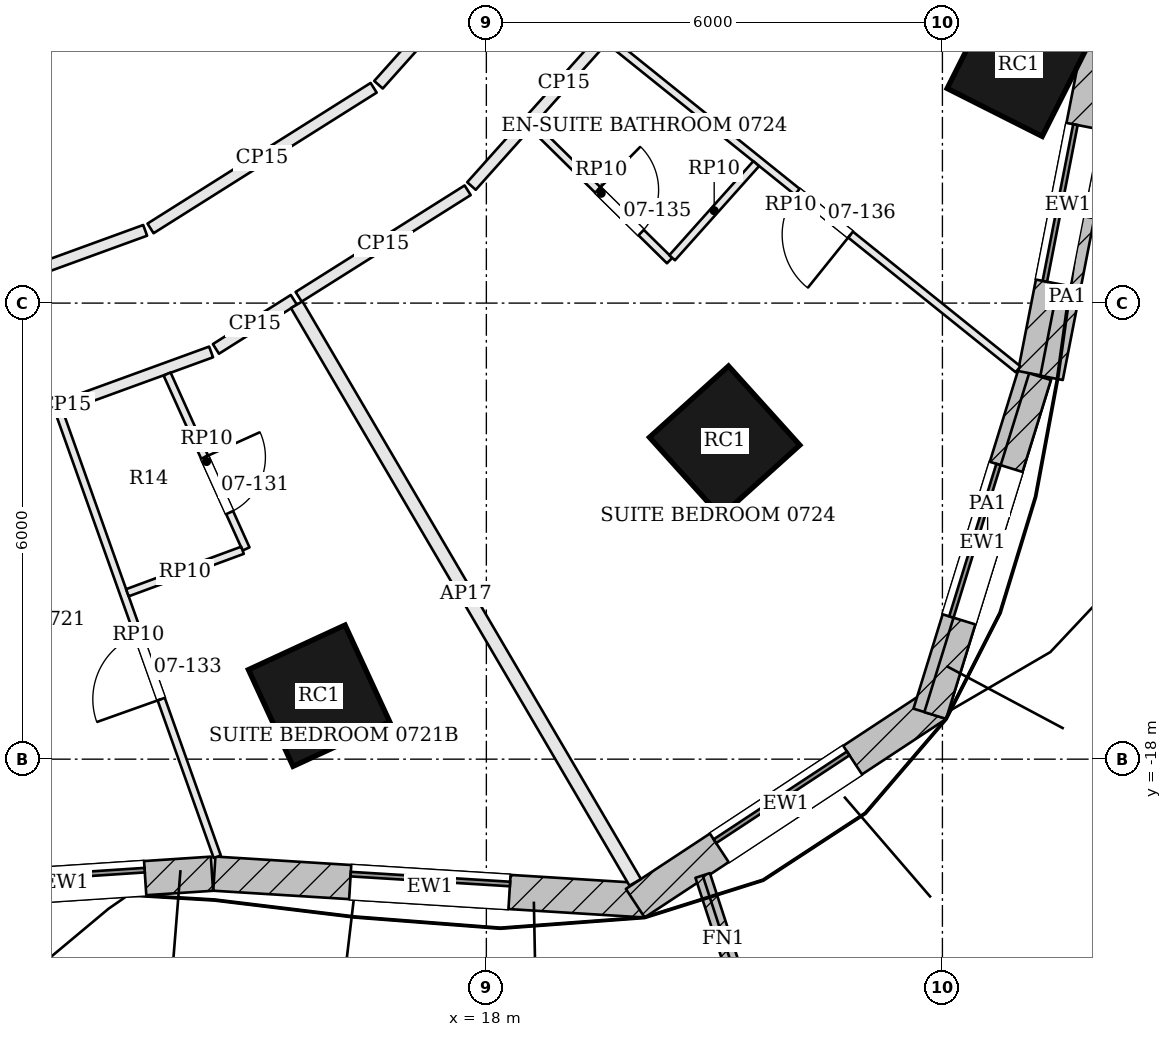
"""IFC4 building model, lengths in metres.
Left out: names, types, materials, properties, quantities, classifications, styles, units other than length and angle.
Written with IfcOpenShell. Run it as: python <this file> out.ifc"""

import sys

from ifc_helpers import new_model, si_unit, direction, frame, frame_2d, origin, origin_2d, place, context, subcontext, project, spatial, rectangle, extrude, element, fill, save


model = new_model("IFC4")
c1 = context("Model", 3, precision=1e-05, world=origin(), true_north=direction((0.0, 1.0)))
c2 = subcontext(c1, "Body", "Model", "MODEL_VIEW")
j1 = project(units=[si_unit("LENGTHUNIT", "METRE"), si_unit("PLANEANGLEUNIT", "RADIAN")], contexts=[c1])
p1 = place(None, origin())
s1 = spatial("IfcSite", under=j1, at=p1, CompositionType="ELEMENT")
p2 = place(p1, origin())
s2 = spatial("IfcBuilding", under=s1, at=p2, CompositionType="ELEMENT")
p3 = place(p2, frame((0.0, 0.0, 41.1)))
s3 = spatial("IfcBuildingStorey", under=s2, at=p3, CompositionType="ELEMENT", Elevation=41.1)
for number, where, z_axis, x_axis in (
    (1, (15.799, -17.165, 0.0), (0.0, 0.0, 1.0), (0.908, 0.419, 0.0)),
    (2, (21.135, -13.817, 0.0), (0.0, 0.0, 1.0), (0.743, 0.67, 0.0)),
    (3, (25.003, -8.866, 0.0), (0.0, 0.0, 1.0), (0.45, 0.893, 0.0)),
):
    element("IfcColumn", number, at=place(p3, frame(where, z_axis=z_axis, x_axis=x_axis)), inside=s3, PredefinedType="COLUMN", context=c2, shape_type="SweptSolid", body=[
        extrude(rectangle(XDim=1.4, YDim=1.4, at=origin_2d()), origin(), (0.0, 0.0, 1.0), 3.6),
    ])
p4 = place(p3, frame((10.537, -19.761, 0.0), z_axis=(0.0, 0.0, 1.0), x_axis=(0.997831357874, 0.065822346084, 0.0)))
e4 = element("IfcWall", 4, at=p4, inside=s3, PredefinedType="SOLIDWALL", context=c2, shape_type="SweptSolid", body=[
    extrude(rectangle(XDim=3.861, YDim=0.45, at=frame_2d((1.931, 0.0))), origin(), (0.0, 0.0, 1.0), 3.4),
])
p5 = place(p4, frame((0.881, 0.0, 0.9)))
e5 = element("IfcOpeningElement", 5, at=p5, cuts=e4, PredefinedType="OPENING", context=c2, shape_type="SweptSolid", body=[
    extrude(rectangle(XDim=2.1, YDim=2.0, at=frame_2d((1.05, 1.0))), frame((0.0, 0.235, 0.0), z_axis=(0.0, -1.0, 0.0), x_axis=(1.0, 0.0, 0.0)), (0.0, 0.0, 1.0), 0.47),
])
p6 = place(p3, frame((14.421, -19.506, 0.0), z_axis=(0.0, 0.0, 1.0), x_axis=(0.998078573447, -0.06196096534, 0.0)))
e6 = element("IfcWall", 6, at=p6, inside=s3, PredefinedType="SOLIDWALL", context=c2, shape_type="SweptSolid", body=[
    extrude(rectangle(XDim=5.682, YDim=0.45, at=frame_2d((2.841, 0.0))), origin(), (0.0, 0.0, 1.0), 3.4),
])
p7 = place(p6, frame((1.791, 0.0, 0.9)))
e7 = element("IfcOpeningElement", 7, at=p7, cuts=e6, PredefinedType="OPENING", context=c2, shape_type="SweptSolid", body=[
    extrude(rectangle(XDim=2.1, YDim=2.0, at=frame_2d((1.05, 1.0))), frame((0.0, 0.235, 0.0), z_axis=(0.0, -1.0, 0.0), x_axis=(1.0, 0.0, 0.0)), (0.0, 0.0, 1.0), 0.47),
])
p8 = place(p3, frame((19.959, -19.895, 0.0), z_axis=(0.0, 0.0, 1.0), x_axis=(0.835201398752, 0.549944200372, 0.0)))
e8 = element("IfcWall", 8, at=p8, inside=s3, PredefinedType="SOLIDWALL", context=c2, shape_type="SweptSolid", body=[
    extrude(rectangle(XDim=4.748, YDim=0.45, at=frame_2d((2.374, 0.0))), origin(), (0.0, 0.0, 1.0), 3.4),
])
p9 = place(p8, frame((1.324, 0.0, 0.9)))
e9 = element("IfcOpeningElement", 9, at=p9, cuts=e8, PredefinedType="OPENING", context=c2, shape_type="SweptSolid", body=[
    extrude(rectangle(XDim=2.1, YDim=2.0, at=frame_2d((1.05, 1.0))), frame((0.0, 0.235, 0.0), z_axis=(0.0, -1.0, 0.0), x_axis=(1.0, 0.0, 0.0)), (0.0, 0.0, 1.0), 0.47),
])
p10 = place(p3, frame((23.834, -17.402, 0.0), z_axis=(0.0, 0.0, 1.0), x_axis=(0.2954658114, 0.955353313855, 0.0)))
e10 = element("IfcWall", 10, at=p10, inside=s3, PredefinedType="SOLIDWALL", context=c2, shape_type="SweptSolid", body=[
    extrude(rectangle(XDim=4.698, YDim=0.45, at=frame_2d((2.349, 0.0))), origin(), (0.0, 0.0, 1.0), 3.4),
])
p11 = place(p10, frame((1.299, 0.0, 0.9)))
e11 = element("IfcOpeningElement", 11, at=p11, cuts=e10, PredefinedType="OPENING", context=c2, shape_type="SweptSolid", body=[
    extrude(rectangle(XDim=2.1, YDim=2.0, at=frame_2d((1.05, 1.0))), frame((0.0, 0.235, 0.0), z_axis=(0.0, -1.0, 0.0), x_axis=(1.0, 0.0, 0.0)), (0.0, 0.0, 1.0), 0.47),
])
p12 = place(p3, frame((25.216, -12.936, 0.0), z_axis=(0.0, 0.0, 1.0), x_axis=(0.191564556994, 0.981480015336, 0.0)))
e12 = element("IfcWall", 12, at=p12, inside=s3, PredefinedType="SOLIDWALL", context=c2, shape_type="SweptSolid", body=[
    extrude(rectangle(XDim=4.551, YDim=0.45, at=frame_2d((2.275, 0.0))), origin(), (0.0, 0.0, 1.0), 3.4),
])
p13 = place(p12, frame((1.226, 0.0, 0.9)))
e13 = element("IfcOpeningElement", 13, at=p13, cuts=e12, PredefinedType="OPENING", context=c2, shape_type="SweptSolid", body=[
    extrude(rectangle(XDim=2.1, YDim=2.0, at=frame_2d((1.05, 1.0))), frame((0.0, 0.235, 0.0), z_axis=(0.0, -1.0, 0.0), x_axis=(1.0, 0.0, 0.0)), (0.0, 0.0, 1.0), 0.47),
])
p14 = place(p3, frame((20.846, -19.53, 0.0), z_axis=(0.0, 0.0, 1.0), x_axis=(0.309732726603, -0.950823662974, 0.0)))
e14 = element("IfcWall", 14, at=p14, inside=s3, PredefinedType="SOLIDWALL", context=c2, shape_type="SweptSolid", body=[
    extrude(rectangle(XDim=1.75, YDim=0.2, at=frame_2d((0.875, 0.0))), origin(), (0.0, 0.0, 1.0), 3.4),
])
p15 = place(p3, frame((23.906, -17.425, 3.6), z_axis=(0.0, 0.0, 1.0), x_axis=(0.295431319656, 0.955363980568, 0.0)))
e15 = element("IfcWall", 15, at=p15, inside=s3, PredefinedType="PARAPET", context=c2, shape_type="SweptSolid", body=[
    extrude(rectangle(XDim=4.666, YDim=0.3, at=frame_2d((2.333, 0.0))), origin(), (0.0, 0.0, 1.0), 1.1),
])
p16 = place(p3, frame((25.436, -12.983, 3.6), z_axis=(0.0, 0.0, 1.0), x_axis=(0.191565926717, 0.981479747993, 0.0)))
e16 = element("IfcWall", 16, at=p16, inside=s3, PredefinedType="PARAPET", context=c2, shape_type="SweptSolid", body=[
    extrude(rectangle(XDim=2.168, YDim=0.3, at=frame_2d((1.084, 0.0))), origin(), (0.0, 0.0, 1.0), 1.1),
])
p17 = place(p3, frame((10.543, -14.04, 0.0), z_axis=(0.0, 0.0, 1.0), x_axis=(0.939576705301, 0.342338450741, 0.0)))
e17 = element("IfcWall", 17, at=p17, inside=s3, PredefinedType="PARTITIONING", context=c2, shape_type="SweptSolid", body=[
    extrude(rectangle(XDim=4.082, YDim=0.15, at=frame_2d((2.041, 0.0))), origin(), (0.0, 0.0, 1.0), 2.68),
])
p18 = place(p3, frame((14.442, -12.603, 0.0), z_axis=(0.0, 0.0, 1.0), x_axis=(0.845976983642, 0.533219413701, 0.0)))
e18 = element("IfcWall", 18, at=p18, inside=s3, PredefinedType="PARTITIONING", context=c2, shape_type="SweptSolid", body=[
    extrude(rectangle(XDim=1.211, YDim=0.15, at=frame_2d((0.606, 0.0))), origin(), (0.0, 0.0, 1.0), 2.68),
])
p19 = place(p3, frame((19.958, -19.62, 0.0), z_axis=(0.0, 0.0, 1.0), x_axis=(-0.505643381875, 0.862742586387, 0.0)))
e19 = element("IfcWall", 19, at=p19, inside=s3, PredefinedType="PARTITIONING", context=c2, shape_type="SweptSolid", body=[
    extrude(rectangle(XDim=8.808, YDim=0.175, at=frame_2d((4.404, 0.0))), origin(), (0.0, 0.0, 1.0), 2.68),
])
p20 = place(p3, frame((15.531, -11.917, 0.0), z_axis=(0.0, 0.0, 1.0), x_axis=(0.84600940038, 0.533167979598, 0.0)))
e20 = element("IfcWall", 20, at=p20, inside=s3, PredefinedType="PARTITIONING", context=c2, shape_type="SweptSolid", body=[
    extrude(rectangle(XDim=2.628, YDim=0.15, at=frame_2d((1.314, 0.0))), origin(), (0.0, 0.0, 1.0), 2.68),
])
p21 = place(p3, frame((17.804, -10.46, 0.0), z_axis=(0.0, 0.0, 1.0), x_axis=(0.666597463623, 0.745417883802, 0.0)))
e21 = element("IfcWall", 21, at=p21, inside=s3, PredefinedType="PARTITIONING", context=c2, shape_type="SweptSolid", body=[
    extrude(rectangle(XDim=3.652, YDim=0.15, at=frame_2d((1.826, 0.0))), origin(), (0.0, 0.0, 1.0), 2.68),
])
p22 = place(p3, frame((18.673, -6.788, 0.0), z_axis=(0.0, 0.0, 1.0), x_axis=(-0.666610670036, -0.745406073623, 0.0)))
e22 = element("IfcWall", 22, at=p22, inside=s3, PredefinedType="PARTITIONING", context=c2, shape_type="SweptSolid", body=[
    extrude(rectangle(XDim=3.139, YDim=0.15, at=frame_2d((1.569, 0.0))), origin(), (0.0, 0.0, 1.0), 2.68),
])
p23 = place(p3, frame((16.517, -9.167, 0.0), z_axis=(0.0, 0.0, 1.0), x_axis=(-0.846000117603, -0.533182708849, 0.0)))
e23 = element("IfcWall", 23, at=p23, inside=s3, PredefinedType="PARTITIONING", context=c2, shape_type="SweptSolid", body=[
    extrude(rectangle(XDim=3.47, YDim=0.15, at=frame_2d((1.735, 0.0))), origin(), (0.0, 0.0, 1.0), 2.68),
])
p24 = place(p3, frame((13.511, -11.043, 0.0), z_axis=(0.0, 0.0, 1.0), x_axis=(-0.939583191704, -0.342320647736, 0.0)))
e24 = element("IfcWall", 24, at=p24, inside=s3, PredefinedType="PARTITIONING", context=c2, shape_type="SweptSolid", body=[
    extrude(rectangle(XDim=3.733, YDim=0.15, at=frame_2d((1.866, 0.0))), origin(), (0.0, 0.0, 1.0), 2.68),
])
p25 = place(p3, frame((14.459, -19.283, 0.0), z_axis=(0.0, 0.0, 1.0), x_axis=(-0.33505478158, 0.942198648556, 0.0)))
e25 = element("IfcWall", 25, at=p25, inside=s3, PredefinedType="PARTITIONING", context=c2, shape_type="SweptSolid", body=[
    extrude(rectangle(XDim=6.192, YDim=0.1, at=frame_2d((3.096, 0.0))), origin(), (0.0, 0.0, 1.0), 2.68),
])
p26 = place(p25, frame((2.2, 0.0, 0.0)))
e26 = element("IfcOpeningElement", 26, at=p26, cuts=e25, PredefinedType="OPENING", context=c2, shape_type="SweptSolid", body=[
    extrude(rectangle(XDim=0.9, YDim=2.4, at=frame_2d((0.45, 1.2))), frame((0.0, 0.06, 0.0), z_axis=(0.0, -1.0, 0.0), x_axis=(1.0, 0.0, 0.0)), (0.0, 0.0, 1.0), 0.12),
])
p27 = place(p3, frame((13.8, -12.933, 0.0), z_axis=(0.0, 0.0, 1.0), x_axis=(0.411317277425, -0.91149223655, 0.0)))
e27 = element("IfcWall", 27, at=p27, inside=s3, PredefinedType="PARTITIONING", context=c2, shape_type="SweptSolid", body=[
    extrude(rectangle(XDim=2.525, YDim=0.1, at=frame_2d((1.262, 0.0))), origin(), (0.0, 0.0, 1.0), 2.68),
])
p28 = place(p27, frame((1.2, 0.0, 0.0)))
e28 = element("IfcOpeningElement", 28, at=p28, cuts=e27, PredefinedType="OPENING", context=c2, shape_type="SweptSolid", body=[
    extrude(rectangle(XDim=0.8, YDim=2.1, at=frame_2d((0.4, 1.05))), frame((0.0, 0.06, 0.0), z_axis=(0.0, -1.0, 0.0), x_axis=(1.0, 0.0, 0.0)), (0.0, 0.0, 1.0), 0.12),
])
p29 = place(p3, frame((14.792, -15.252, 0.0), z_axis=(0.0, 0.0, 1.0), x_axis=(-0.93817510653, -0.346161045596, 0.0)))
e29 = element("IfcWall", 29, at=p29, inside=s3, PredefinedType="PARTITIONING", context=c2, shape_type="SweptSolid", body=[
    extrude(rectangle(XDim=1.614, YDim=0.1, at=frame_2d((0.807, 0.0))), origin(), (0.0, 0.0, 1.0), 2.68),
])
p30 = place(p3, frame((24.996, -12.871, 0.0), z_axis=(0.0, 0.0, 1.0), x_axis=(-0.779382782797, 0.626548065099, 0.0)))
e30 = element("IfcWall", 30, at=p30, inside=s3, PredefinedType="PARTITIONING", context=c2, shape_type="SweptSolid", body=[
    extrude(rectangle(XDim=6.902, YDim=0.1, at=frame_2d((3.451, 0.0))), origin(), (0.0, 0.0, 1.0), 2.68),
])
p31 = place(p30, frame((2.828, 0.0, 0.0)))
e31 = element("IfcOpeningElement", 31, at=p31, cuts=e30, PredefinedType="OPENING", context=c2, shape_type="SweptSolid", body=[
    extrude(rectangle(XDim=0.9, YDim=2.4, at=frame_2d((0.45, 1.2))), frame((0.0, 0.06, 0.0), z_axis=(0.0, -1.0, 0.0), x_axis=(1.0, 0.0, 0.0)), (0.0, 0.0, 1.0), 0.12),
])
p32 = place(p3, frame((18.611, -9.67, 0.0), z_axis=(0.0, 0.0, 1.0), x_axis=(0.712836736893, -0.701330012573, 0.0)))
e32 = element("IfcWall", 32, at=p32, inside=s3, PredefinedType="PARTITIONING", context=c2, shape_type="SweptSolid", body=[
    extrude(rectangle(XDim=2.525, YDim=0.1, at=frame_2d((1.262, 0.0))), origin(), (0.0, 0.0, 1.0), 2.68),
])
p33 = place(p32, frame((1.2, 0.0, 0.0)))
e33 = element("IfcOpeningElement", 33, at=p33, cuts=e32, PredefinedType="OPENING", context=c2, shape_type="SweptSolid", body=[
    extrude(rectangle(XDim=0.8, YDim=2.1, at=frame_2d((0.4, 1.05))), frame((0.0, 0.06, 0.0), z_axis=(0.0, -1.0, 0.0), x_axis=(1.0, 0.0, 0.0)), (0.0, 0.0, 1.0), 0.12),
])
p34 = place(p3, frame((20.444, -11.403, 0.0), z_axis=(0.0, 0.0, 1.0), x_axis=(0.666369249882, 0.745621903388, 0.0)))
e34 = element("IfcWall", 34, at=p34, inside=s3, PredefinedType="PARTITIONING", context=c2, shape_type="SweptSolid", body=[
    extrude(rectangle(XDim=1.66, YDim=0.1, at=frame_2d((0.83, 0.0))), origin(), (0.0, 0.0, 1.0), 2.68),
])
p35 = place(p5, origin())
e35 = element("IfcWindow", 35, at=p35, inside=s3, PartitioningType="SINGLE_PANEL", PredefinedType="WINDOW", context=c2, shape_type="SweptSolid", body=[
    extrude(rectangle(XDim=2.1, YDim=2.0, at=frame_2d((1.05, 1.0))), frame((0.0, 0.135, 0.0), z_axis=(0.0, -1.0, 0.0), x_axis=(1.0, 0.0, 0.0)), (0.0, 0.0, 1.0), 0.06),
])
fill(e5, e35)
p36 = place(p7, origin())
e36 = element("IfcWindow", 36, at=p36, inside=s3, PartitioningType="SINGLE_PANEL", PredefinedType="WINDOW", context=c2, shape_type="SweptSolid", body=[
    extrude(rectangle(XDim=2.1, YDim=2.0, at=frame_2d((1.05, 1.0))), frame((0.0, 0.135, 0.0), z_axis=(0.0, -1.0, 0.0), x_axis=(1.0, 0.0, 0.0)), (0.0, 0.0, 1.0), 0.06),
])
fill(e7, e36)
p37 = place(p9, origin())
e37 = element("IfcWindow", 37, at=p37, inside=s3, PartitioningType="SINGLE_PANEL", PredefinedType="WINDOW", context=c2, shape_type="SweptSolid", body=[
    extrude(rectangle(XDim=2.1, YDim=2.0, at=frame_2d((1.05, 1.0))), frame((0.0, 0.135, 0.0), z_axis=(0.0, -1.0, 0.0), x_axis=(1.0, 0.0, 0.0)), (0.0, 0.0, 1.0), 0.06),
])
fill(e9, e37)
p38 = place(p11, origin())
e38 = element("IfcWindow", 38, at=p38, inside=s3, PartitioningType="SINGLE_PANEL", PredefinedType="WINDOW", context=c2, shape_type="SweptSolid", body=[
    extrude(rectangle(XDim=2.1, YDim=2.0, at=frame_2d((1.05, 1.0))), frame((0.0, 0.135, 0.0), z_axis=(0.0, -1.0, 0.0), x_axis=(1.0, 0.0, 0.0)), (0.0, 0.0, 1.0), 0.06),
])
fill(e11, e38)
p39 = place(p13, origin())
e39 = element("IfcWindow", 39, at=p39, inside=s3, PartitioningType="SINGLE_PANEL", PredefinedType="WINDOW", context=c2, shape_type="SweptSolid", body=[
    extrude(rectangle(XDim=2.1, YDim=2.0, at=frame_2d((1.05, 1.0))), frame((0.0, 0.135, 0.0), z_axis=(0.0, -1.0, 0.0), x_axis=(1.0, 0.0, 0.0)), (0.0, 0.0, 1.0), 0.06),
])
fill(e13, e39)
p40 = place(p28, origin())
e40 = element("IfcDoor", 40, at=p40, inside=s3, OperationType="SINGLE_SWING_LEFT", PredefinedType="DOOR", context=c2, shape_type="SweptSolid", body=[
    extrude(rectangle(XDim=0.8, YDim=2.1, at=frame_2d((0.4, 1.05))), frame((0.0, 0.025, 0.0), z_axis=(0.0, -1.0, 0.0), x_axis=(1.0, 0.0, 0.0)), (0.0, 0.0, 1.0), 0.05),
])
fill(e28, e40)
p41 = place(p26, origin())
e41 = element("IfcDoor", 41, at=p41, inside=s3, OperationType="SINGLE_SWING_LEFT", PredefinedType="DOOR", context=c2, shape_type="SweptSolid", body=[
    extrude(rectangle(XDim=0.9, YDim=2.4, at=frame_2d((0.45, 1.2))), frame((0.0, 0.025, 0.0), z_axis=(0.0, -1.0, 0.0), x_axis=(1.0, 0.0, 0.0)), (0.0, 0.0, 1.0), 0.05),
])
fill(e26, e41)
p42 = place(p33, origin())
e42 = element("IfcDoor", 42, at=p42, inside=s3, OperationType="SINGLE_SWING_LEFT", PredefinedType="DOOR", context=c2, shape_type="SweptSolid", body=[
    extrude(rectangle(XDim=0.8, YDim=2.1, at=frame_2d((0.4, 1.05))), frame((0.0, 0.025, 0.0), z_axis=(0.0, -1.0, 0.0), x_axis=(1.0, 0.0, 0.0)), (0.0, 0.0, 1.0), 0.05),
])
fill(e33, e42)
p43 = place(p31, origin())
e43 = element("IfcDoor", 43, at=p43, inside=s3, OperationType="SINGLE_SWING_LEFT", PredefinedType="DOOR", context=c2, shape_type="SweptSolid", body=[
    extrude(rectangle(XDim=0.9, YDim=2.4, at=frame_2d((0.45, 1.2))), frame((0.0, 0.025, 0.0), z_axis=(0.0, -1.0, 0.0), x_axis=(1.0, 0.0, 0.0)), (0.0, 0.0, 1.0), 0.05),
])
fill(e31, e43)
save(model, sys.argv[1])
